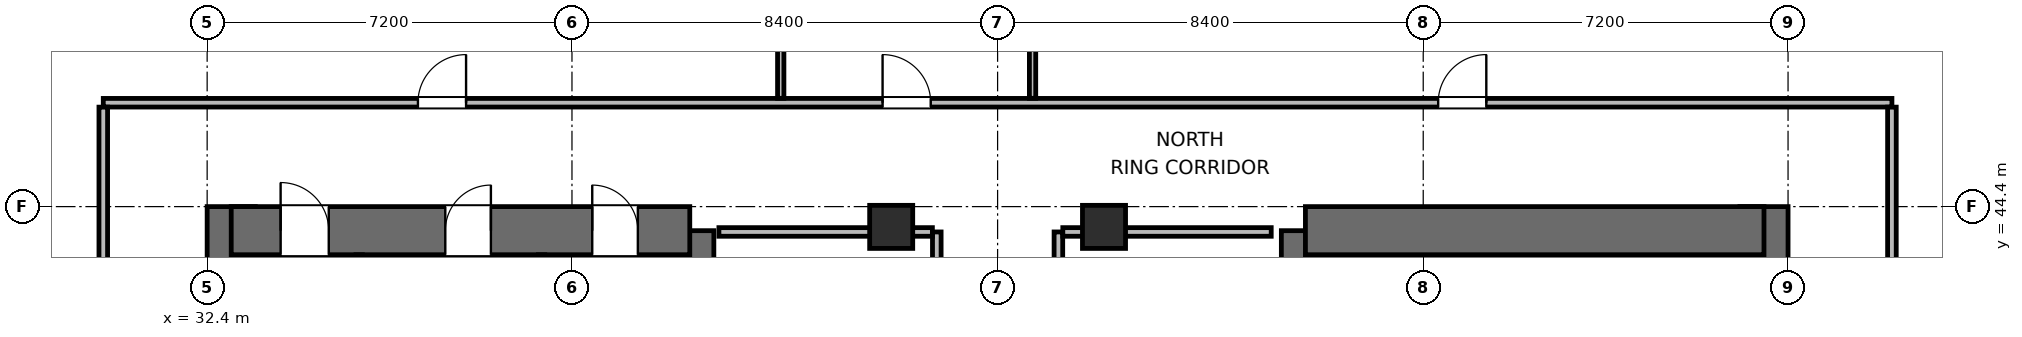
"""IFC4 building model, lengths in metres.
Left out: names, types, materials, properties, quantities, classifications, styles, units other than length and angle.
Written with IfcOpenShell. Run it as: python <this file> out.ifc"""

import sys

from ifc_helpers import new_model, si_unit, direction, frame, frame_2d, origin, origin_2d, place, context, subcontext, project, spatial, rectangle, extrude, element, fill, save


model = new_model("IFC4")
c1 = context("Model", 3, precision=1e-05, world=origin(), true_north=direction((0.0, 1.0)))
c2 = subcontext(c1, "Body", "Model", "MODEL_VIEW")
j1 = project(units=[si_unit("LENGTHUNIT", "METRE"), si_unit("PLANEANGLEUNIT", "RADIAN")], contexts=[c1])
p1 = place(None, origin())
s1 = spatial("IfcSite", under=j1, at=p1, CompositionType="ELEMENT")
p2 = place(p1, origin())
s2 = spatial("IfcBuilding", under=s1, at=p2, CompositionType="ELEMENT")
p3 = place(p2, frame((0.0, 0.0, 29.4)))
s3 = spatial("IfcBuildingStorey", under=s2, at=p3, CompositionType="ELEMENT", Elevation=29.4)
p4 = place(p3, frame((32.875, 27.6, 0.0), z_axis=(0.0, 0.0, 1.0), x_axis=(0.0, 1.0, 0.0)))
e1 = element("IfcWall", 1, at=p4, inside=s3, PredefinedType="SHEAR", context=c2, shape_type="SweptSolid", body=[
    extrude(rectangle(XDim=16.8, YDim=0.95, at=frame_2d((8.4, 0.0))), origin(), (0.0, 0.0, 1.0), 3.9),
])
p5 = place(p3, frame((41.925, 37.8, 0.0), z_axis=(0.0, 0.0, 1.0), x_axis=(0.0, 1.0, 0.0)))
e2 = element("IfcWall", 2, at=p5, inside=s3, PredefinedType="SHEAR", context=c2, shape_type="SweptSolid", body=[
    extrude(rectangle(XDim=6.125, YDim=0.95, at=frame_2d((3.062, 0.0))), origin(), (0.0, 0.0, 1.0), 3.9),
])
p6 = place(p3, frame((32.875, 43.925, 0.0), z_axis=(0.0, 0.0, 1.0), x_axis=(1.0, 0.0, 0.0)))
e3 = element("IfcWall", 3, at=p6, inside=s3, PredefinedType="SHEAR", context=c2, shape_type="SweptSolid", body=[
    extrude(rectangle(XDim=9.05, YDim=0.95, at=frame_2d((4.525, 0.0))), origin(), (0.0, 0.0, 1.0), 3.9),
])
p7 = place(p6, frame((0.975, 0.0, 0.0)))
e4 = element("IfcOpeningElement", 4, at=p7, cuts=e3, PredefinedType="OPENING", context=c2, shape_type="SweptSolid", body=[
    extrude(rectangle(XDim=0.95, YDim=2.04, at=frame_2d((0.475, 1.02))), frame((0.0, 0.485, 0.0), z_axis=(0.0, -1.0, 0.0), x_axis=(1.0, 0.0, 0.0)), (0.0, 0.0, 1.0), 0.97),
])
p8 = place(p6, frame((4.225, 0.0, 0.0)))
e5 = element("IfcOpeningElement", 5, at=p8, cuts=e3, PredefinedType="OPENING", context=c2, shape_type="SweptSolid", body=[
    extrude(rectangle(XDim=0.9, YDim=2.02, at=frame_2d((0.45, 1.01))), frame((0.0, 0.485, 0.0), z_axis=(0.0, -1.0, 0.0), x_axis=(1.0, 0.0, 0.0)), (0.0, 0.0, 1.0), 0.97),
])
p9 = place(p6, frame((7.125, 0.0, 0.0)))
e6 = element("IfcOpeningElement", 6, at=p9, cuts=e3, PredefinedType="OPENING", context=c2, shape_type="SweptSolid", body=[
    extrude(rectangle(XDim=0.9, YDim=2.02, at=frame_2d((0.45, 1.01))), frame((0.0, 0.485, 0.0), z_axis=(0.0, -1.0, 0.0), x_axis=(1.0, 0.0, 0.0)), (0.0, 0.0, 1.0), 0.97),
])
p10 = place(p3, frame((54.075, 38.0, 0.0), z_axis=(0.0, 0.0, 1.0), x_axis=(0.0, 1.0, 0.0)))
e7 = element("IfcWall", 7, at=p10, inside=s3, PredefinedType="SHEAR", context=c2, shape_type="SweptSolid", body=[
    extrude(rectangle(XDim=5.925, YDim=0.95, at=frame_2d((2.962, 0.0))), origin(), (0.0, 0.0, 1.0), 3.9),
])
p11 = place(p3, frame((63.125, 27.6, 0.0), z_axis=(0.0, 0.0, 1.0), x_axis=(0.0, 1.0, 0.0)))
e8 = element("IfcWall", 8, at=p11, inside=s3, PredefinedType="SHEAR", context=c2, shape_type="SweptSolid", body=[
    extrude(rectangle(XDim=16.8, YDim=0.95, at=frame_2d((8.4, 0.0))), origin(), (0.0, 0.0, 1.0), 3.9),
])
p12 = place(p3, frame((54.075, 43.925, 0.0), z_axis=(0.0, 0.0, 1.0), x_axis=(1.0, 0.0, 0.0)))
e9 = element("IfcWall", 9, at=p12, inside=s3, PredefinedType="SHEAR", context=c2, shape_type="SweptSolid", body=[
    extrude(rectangle(XDim=9.05, YDim=0.95, at=frame_2d((4.525, 0.0))), origin(), (0.0, 0.0, 1.0), 3.9),
])
for number, where, z_axis, x_axis in (
    (10, (45.9, 44.0, 0.0), (0.0, 0.0, 1.0), (1.0, 0.0, 0.0)),
    (11, (50.1, 44.0, 0.0), (0.0, 0.0, 1.0), (1.0, 0.0, 0.0)),
):
    element("IfcColumn", number, at=place(p3, frame(where, z_axis=z_axis, x_axis=x_axis)), inside=s3, PredefinedType="COLUMN", context=c2, shape_type="SweptSolid", body=[
        extrude(rectangle(XDim=0.85, YDim=0.85, at=origin_2d()), origin(), (0.0, 0.0, 1.0), 3.9),
    ])
for number, where, z_axis, x_axis in (
    (12, (35.4, 41.095, 0.0), (0.0, 0.0, 1.0), (0.0, 1.0, 0.0)),
    (13, (39.0, 41.095, 0.0), (0.0, 0.0, 1.0), (0.0, 1.0, 0.0)),
):
    element("IfcWall", number, at=place(p3, frame(where, z_axis=z_axis, x_axis=x_axis)), inside=s3, PredefinedType="PARTITIONING", context=c2, shape_type="SweptSolid", body=[
        extrude(rectangle(XDim=2.355, YDim=0.125, at=frame_2d((1.177, 0.0))), origin(), (0.0, 0.0, 1.0), 3.64),
    ])
p13 = place(p3, frame((46.8, 37.9, 0.0), z_axis=(0.0, 0.0, 1.0), x_axis=(0.0, 1.0, 0.0)))
e14 = element("IfcWall", 14, at=p13, inside=s3, PredefinedType="PARTITIONING", context=c2, shape_type="SweptSolid", body=[
    extrude(rectangle(XDim=6.0, YDim=0.17, at=frame_2d((3.0, 0.0))), origin(), (0.0, 0.0, 1.0), 3.64),
])
p14 = place(p13, frame((1.47, 0.0, 0.0)))
e15 = element("IfcOpeningElement", 15, at=p14, cuts=e14, PredefinedType="OPENING", context=c2, shape_type="SweptSolid", body=[
    extrude(rectangle(XDim=0.9, YDim=2.02, at=frame_2d((0.45, 1.01))), frame((0.0, 0.095, 0.0), z_axis=(0.0, -1.0, 0.0), x_axis=(1.0, 0.0, 0.0)), (0.0, 0.0, 1.0), 0.19),
])
p15 = place(p13, frame((4.47, 0.0, 0.0)))
e16 = element("IfcOpeningElement", 16, at=p15, cuts=e14, PredefinedType="OPENING", context=c2, shape_type="SweptSolid", body=[
    extrude(rectangle(XDim=0.9, YDim=2.02, at=frame_2d((0.45, 1.01))), frame((0.0, 0.095, 0.0), z_axis=(0.0, -1.0, 0.0), x_axis=(1.0, 0.0, 0.0)), (0.0, 0.0, 1.0), 0.19),
])
p16 = place(p3, frame((42.5, 43.9, 0.0), z_axis=(0.0, 0.0, 1.0), x_axis=(1.0, 0.0, 0.0)))
e17 = element("IfcWall", 17, at=p16, inside=s3, PredefinedType="PARTITIONING", context=c2, shape_type="SweptSolid", body=[
    extrude(rectangle(XDim=4.213, YDim=0.17, at=frame_2d((2.106, 0.0))), origin(), (0.0, 0.0, 1.0), 2.525),
])
p17 = place(p3, frame((49.2, 37.9, 0.0), z_axis=(0.0, 0.0, 1.0), x_axis=(0.0, 1.0, 0.0)))
e18 = element("IfcWall", 18, at=p17, inside=s3, PredefinedType="PARTITIONING", context=c2, shape_type="SweptSolid", body=[
    extrude(rectangle(XDim=6.0, YDim=0.17, at=frame_2d((3.0, 0.0))), origin(), (0.0, 0.0, 1.0), 3.64),
])
p18 = place(p17, frame((2.55, 0.0, 0.0)))
e19 = element("IfcOpeningElement", 19, at=p18, cuts=e18, PredefinedType="OPENING", context=c2, shape_type="SweptSolid", body=[
    extrude(rectangle(XDim=0.9, YDim=2.02, at=frame_2d((0.45, 1.01))), frame((0.0, 0.095, 0.0), z_axis=(0.0, -1.0, 0.0), x_axis=(1.0, 0.0, 0.0)), (0.0, 0.0, 1.0), 0.19),
])
p19 = place(p3, frame((49.287, 43.9, 0.0), z_axis=(0.0, 0.0, 1.0), x_axis=(1.0, 0.0, 0.0)))
e20 = element("IfcWall", 20, at=p19, inside=s3, PredefinedType="PARTITIONING", context=c2, shape_type="SweptSolid", body=[
    extrude(rectangle(XDim=4.113, YDim=0.17, at=frame_2d((2.056, 0.0))), origin(), (0.0, 0.0, 1.0), 2.525),
])
p20 = place(p3, frame((30.35, 46.45, 0.0), z_axis=(0.0, 0.0, 1.0), x_axis=(1.0, 0.0, 0.0)))
e21 = element("IfcWall", 21, at=p20, inside=s3, PredefinedType="PARTITIONING", context=c2, shape_type="SweptSolid", body=[
    extrude(rectangle(XDim=35.3, YDim=0.17, at=frame_2d((17.65, 0.0))), origin(), (0.0, 0.0, 1.0), 3.64),
])
p21 = place(p20, frame((6.21, 0.0, 0.0)))
e22 = element("IfcOpeningElement", 22, at=p21, cuts=e21, PredefinedType="OPENING", context=c2, shape_type="SweptSolid", body=[
    extrude(rectangle(XDim=0.95, YDim=2.04, at=frame_2d((0.475, 1.02))), frame((0.0, 0.095, 0.0), z_axis=(0.0, -1.0, 0.0), x_axis=(1.0, 0.0, 0.0)), (0.0, 0.0, 1.0), 0.19),
])
p22 = place(p20, frame((15.38, 0.0, 0.0)))
e23 = element("IfcOpeningElement", 23, at=p22, cuts=e21, PredefinedType="OPENING", context=c2, shape_type="SweptSolid", body=[
    extrude(rectangle(XDim=0.95, YDim=2.04, at=frame_2d((0.475, 1.02))), frame((0.0, 0.095, 0.0), z_axis=(0.0, -1.0, 0.0), x_axis=(1.0, 0.0, 0.0)), (0.0, 0.0, 1.0), 0.19),
])
p23 = place(p20, frame((26.345, 0.0, 0.0)))
e24 = element("IfcOpeningElement", 24, at=p23, cuts=e21, PredefinedType="OPENING", context=c2, shape_type="SweptSolid", body=[
    extrude(rectangle(XDim=0.95, YDim=2.04, at=frame_2d((0.475, 1.02))), frame((0.0, 0.095, 0.0), z_axis=(0.0, -1.0, 0.0), x_axis=(1.0, 0.0, 0.0)), (0.0, 0.0, 1.0), 0.19),
])
p24 = place(p3, frame((30.35, 25.637, 0.0), z_axis=(0.0, 0.0, 1.0), x_axis=(0.0, 1.0, 0.0)))
e25 = element("IfcWall", 25, at=p24, inside=s3, PredefinedType="PARTITIONING", context=c2, shape_type="SweptSolid", body=[
    extrude(rectangle(XDim=20.726, YDim=0.17, at=frame_2d((10.363, 0.0))), origin(), (0.0, 0.0, 1.0), 3.64),
])
p25 = place(p24, frame((4.263, 0.0, 0.0)))
e26 = element("IfcOpeningElement", 26, at=p25, cuts=e25, PredefinedType="OPENING", context=c2, shape_type="SweptSolid", body=[
    extrude(rectangle(XDim=0.95, YDim=2.04, at=frame_2d((0.475, 1.02))), frame((0.0, 0.095, 0.0), z_axis=(0.0, -1.0, 0.0), x_axis=(1.0, 0.0, 0.0)), (0.0, 0.0, 1.0), 0.19),
])
p26 = place(p24, frame((14.713, 0.0, 0.0)))
e27 = element("IfcOpeningElement", 27, at=p26, cuts=e25, PredefinedType="OPENING", context=c2, shape_type="SweptSolid", body=[
    extrude(rectangle(XDim=0.95, YDim=2.04, at=frame_2d((0.475, 1.02))), frame((0.0, 0.095, 0.0), z_axis=(0.0, -1.0, 0.0), x_axis=(1.0, 0.0, 0.0)), (0.0, 0.0, 1.0), 0.19),
])
p27 = place(p3, frame((65.65, 25.637, 0.0), z_axis=(0.0, 0.0, 1.0), x_axis=(0.0, 1.0, 0.0)))
e28 = element("IfcWall", 28, at=p27, inside=s3, PredefinedType="PARTITIONING", context=c2, shape_type="SweptSolid", body=[
    extrude(rectangle(XDim=20.726, YDim=0.17, at=frame_2d((10.363, 0.0))), origin(), (0.0, 0.0, 1.0), 3.64),
])
p28 = place(p27, frame((4.163, 0.0, 0.0)))
e29 = element("IfcOpeningElement", 29, at=p28, cuts=e28, PredefinedType="OPENING", context=c2, shape_type="SweptSolid", body=[
    extrude(rectangle(XDim=0.95, YDim=2.04, at=frame_2d((0.475, 1.02))), frame((0.0, 0.095, 0.0), z_axis=(0.0, -1.0, 0.0), x_axis=(1.0, 0.0, 0.0)), (0.0, 0.0, 1.0), 0.19),
])
p29 = place(p27, frame((14.613, 0.0, 0.0)))
e30 = element("IfcOpeningElement", 30, at=p29, cuts=e28, PredefinedType="OPENING", context=c2, shape_type="SweptSolid", body=[
    extrude(rectangle(XDim=0.95, YDim=2.04, at=frame_2d((0.475, 1.02))), frame((0.0, 0.095, 0.0), z_axis=(0.0, -1.0, 0.0), x_axis=(1.0, 0.0, 0.0)), (0.0, 0.0, 1.0), 0.19),
])
p30 = place(p3, frame((43.72, 46.537, 0.0), z_axis=(0.0, 0.0, 1.0), x_axis=(0.0, 1.0, 0.0)))
e31 = element("IfcWall", 31, at=p30, inside=s3, PredefinedType="PARTITIONING", context=c2, shape_type="SweptSolid", body=[
    extrude(rectangle(XDim=14.093, YDim=0.125, at=frame_2d((7.046, 0.0))), origin(), (0.0, 0.0, 1.0), 3.003),
])
p31 = place(p3, frame((48.69, 46.537, 0.0), z_axis=(0.0, 0.0, 1.0), x_axis=(0.0, 1.0, 0.0)))
e32 = element("IfcWall", 32, at=p31, inside=s3, PredefinedType="PARTITIONING", context=c2, shape_type="SweptSolid", body=[
    extrude(rectangle(XDim=12.003, YDim=0.125, at=frame_2d((6.001, 0.0))), origin(), (0.0, 0.0, 1.0), 3.64),
])
p32 = place(p7, origin())
e33 = element("IfcDoor", 33, at=p32, inside=s3, OperationType="SINGLE_SWING_LEFT", PredefinedType="DOOR", context=c2, shape_type="SweptSolid", body=[
    extrude(rectangle(XDim=0.95, YDim=2.04, at=frame_2d((0.475, 1.02))), frame((0.0, 0.025, 0.0), z_axis=(0.0, -1.0, 0.0), x_axis=(1.0, 0.0, 0.0)), (0.0, 0.0, 1.0), 0.05),
])
fill(e4, e33)
p33 = place(p8, origin())
e34 = element("IfcDoor", 34, at=p33, inside=s3, OperationType="SINGLE_SWING_RIGHT", PredefinedType="DOOR", context=c2, shape_type="SweptSolid", body=[
    extrude(rectangle(XDim=0.9, YDim=2.02, at=frame_2d((0.45, 1.01))), frame((0.0, 0.025, 0.0), z_axis=(0.0, -1.0, 0.0), x_axis=(1.0, 0.0, 0.0)), (0.0, 0.0, 1.0), 0.05),
])
fill(e5, e34)
p34 = place(p9, origin())
e35 = element("IfcDoor", 35, at=p34, inside=s3, OperationType="SINGLE_SWING_LEFT", PredefinedType="DOOR", context=c2, shape_type="SweptSolid", body=[
    extrude(rectangle(XDim=0.9, YDim=2.02, at=frame_2d((0.45, 1.01))), frame((0.0, 0.025, 0.0), z_axis=(0.0, -1.0, 0.0), x_axis=(1.0, 0.0, 0.0)), (0.0, 0.0, 1.0), 0.05),
])
fill(e6, e35)
p35 = place(p21, origin())
e36 = element("IfcDoor", 36, at=p35, inside=s3, OperationType="SINGLE_SWING_RIGHT", PredefinedType="DOOR", context=c2, shape_type="SweptSolid", body=[
    extrude(rectangle(XDim=0.95, YDim=2.04, at=frame_2d((0.475, 1.02))), frame((0.0, 0.025, 0.0), z_axis=(0.0, -1.0, 0.0), x_axis=(1.0, 0.0, 0.0)), (0.0, 0.0, 1.0), 0.05),
])
fill(e22, e36)
p36 = place(p22, origin())
e37 = element("IfcDoor", 37, at=p36, inside=s3, OperationType="SINGLE_SWING_LEFT", PredefinedType="DOOR", context=c2, shape_type="SweptSolid", body=[
    extrude(rectangle(XDim=0.95, YDim=2.04, at=frame_2d((0.475, 1.02))), frame((0.0, 0.025, 0.0), z_axis=(0.0, -1.0, 0.0), x_axis=(1.0, 0.0, 0.0)), (0.0, 0.0, 1.0), 0.05),
])
fill(e23, e37)
p37 = place(p23, origin())
e38 = element("IfcDoor", 38, at=p37, inside=s3, OperationType="SINGLE_SWING_RIGHT", PredefinedType="DOOR", context=c2, shape_type="SweptSolid", body=[
    extrude(rectangle(XDim=0.95, YDim=2.04, at=frame_2d((0.475, 1.02))), frame((0.0, 0.025, 0.0), z_axis=(0.0, -1.0, 0.0), x_axis=(1.0, 0.0, 0.0)), (0.0, 0.0, 1.0), 0.05),
])
fill(e24, e38)
save(model, sys.argv[1])
